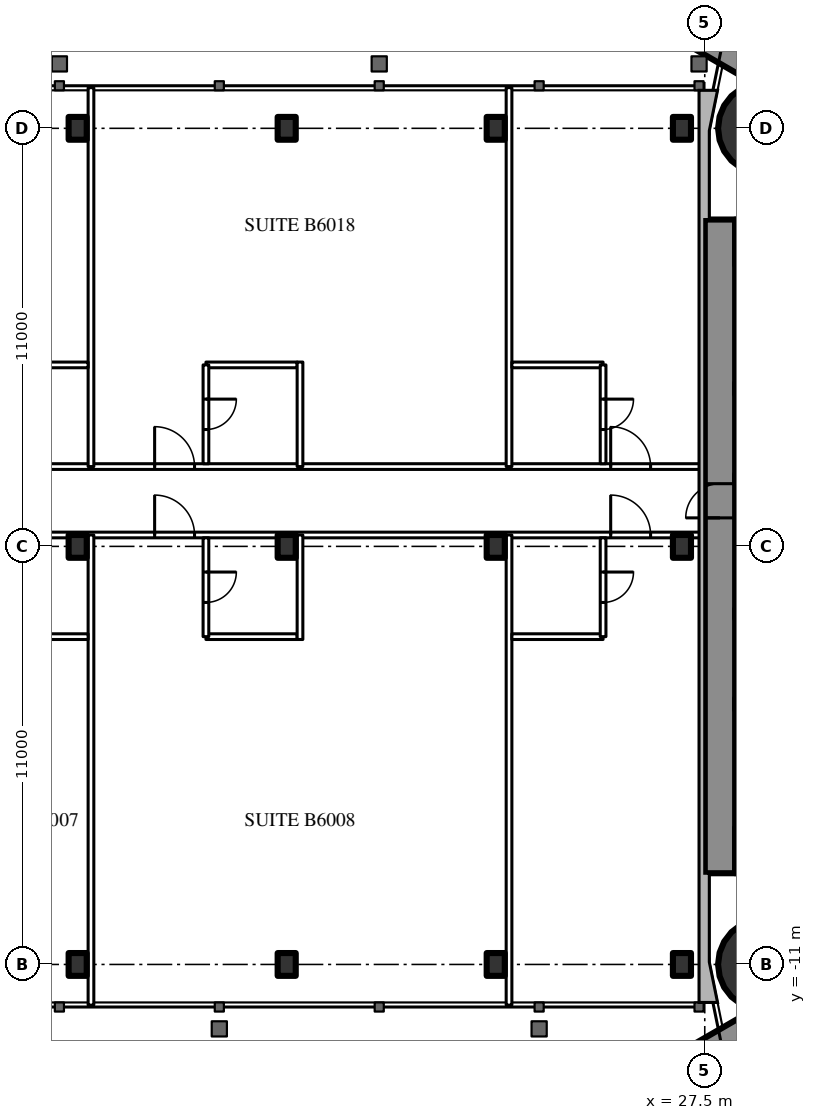
"""IFC4 building model, lengths in metres.
Left out: names, types, materials, properties, quantities, classifications, styles, units other than length and angle.
Written with IfcOpenShell. Run it as: python <this file> out.ifc"""

import sys

from ifc_helpers import new_model, si_unit, direction, frame, frame_2d, origin, origin_2d, place, context, subcontext, project, spatial, rectangle, circle, i_section, extrude, element, fill, save


model = new_model("IFC4")
c1 = context("Model", 3, precision=1e-05, world=origin(), true_north=direction((0.0, 1.0)))
c2 = subcontext(c1, "Body", "Model", "MODEL_VIEW")
j1 = project(units=[si_unit("LENGTHUNIT", "METRE"), si_unit("PLANEANGLEUNIT", "RADIAN")], contexts=[c1])
p1 = place(None, origin())
s1 = spatial("IfcSite", under=j1, at=p1, CompositionType="ELEMENT")
p2 = place(p1, origin())
s2 = spatial("IfcBuilding", under=s1, at=p2, CompositionType="ELEMENT")
p3 = place(p2, frame((0.0, 0.0, 226.1)))
s3 = spatial("IfcBuildingStorey", under=s2, at=p3, CompositionType="ELEMENT", Elevation=226.1)
for number, where, z_axis, x_axis in (
    (1, (29.05, 11.0, 0.0), (0.0, 0.0, 1.0), (1.0, 0.0, 0.0)),
    (2, (29.05, -11.0, 0.0), (0.0, 0.0, 1.0), (1.0, 0.0, 0.0)),
):
    element("IfcColumn", number, at=place(p3, frame(where, z_axis=z_axis, x_axis=x_axis)), inside=s3, PredefinedType="COLUMN", context=c2, shape_type="SweptSolid", body=[
        extrude(circle(Radius=1.2, at=origin_2d()), origin(), (0.0, 0.0, 1.0), 3.6),
    ])
p4 = place(p3, frame((27.9, -8.6, 0.0), z_axis=(0.0, 0.0, 1.0), x_axis=(0.0, 1.0, 0.0)))
e3 = element("IfcWall", 3, at=p4, inside=s3, PredefinedType="SHEAR", context=c2, shape_type="SweptSolid", body=[
    extrude(rectangle(XDim=17.2, YDim=0.8, at=frame_2d((8.6, 0.0))), origin(), (0.0, 0.0, 1.0), 3.6),
])
p5 = place(p4, frame((9.35, 0.0, 0.0)))
e4 = element("IfcOpeningElement", 4, at=p5, cuts=e3, PredefinedType="OPENING", context=c2, shape_type="SweptSolid", body=[
    extrude(rectangle(XDim=0.9, YDim=2.2, at=frame_2d((0.45, 1.1))), frame((0.0, 0.41, 0.0), z_axis=(0.0, -1.0, 0.0), x_axis=(1.0, 0.0, 0.0)), (0.0, 0.0, 1.0), 0.82),
])
p6 = place(p3, frame((28.3, -8.0, 0.0), z_axis=(0.0, 0.0, 1.0), x_axis=(1.0, 0.0, 0.0)))
e5 = element("IfcWall", 5, at=p6, inside=s3, PredefinedType="SHEAR", context=c2, shape_type="SweptSolid", body=[
    extrude(rectangle(XDim=8.4, YDim=1.2, at=frame_2d((4.2, 0.0))), origin(), (0.0, 0.0, 1.0), 3.6),
])
p7 = place(p6, frame((0.25, 0.0, 0.0)))
e6 = element("IfcOpeningElement", 6, at=p7, cuts=e5, PredefinedType="OPENING", context=c2, shape_type="SweptSolid", body=[
    extrude(rectangle(XDim=1.0, YDim=2.2, at=frame_2d((0.5, 1.1))), frame((0.0, 0.61, 0.0), z_axis=(0.0, -1.0, 0.0), x_axis=(1.0, 0.0, 0.0)), (0.0, 0.0, 1.0), 1.22),
])
p8 = place(p3, frame((28.3, 8.0, 0.0), z_axis=(0.0, 0.0, 1.0), x_axis=(1.0, 0.0, 0.0)))
e7 = element("IfcWall", 7, at=p8, inside=s3, PredefinedType="SHEAR", context=c2, shape_type="SweptSolid", body=[
    extrude(rectangle(XDim=8.4, YDim=1.2, at=frame_2d((4.2, 0.0))), origin(), (0.0, 0.0, 1.0), 3.6),
])
p9 = place(p8, frame((0.25, 0.0, 0.0)))
e8 = element("IfcOpeningElement", 8, at=p9, cuts=e7, PredefinedType="OPENING", context=c2, shape_type="SweptSolid", body=[
    extrude(rectangle(XDim=1.0, YDim=2.2, at=frame_2d((0.5, 1.1))), frame((0.0, 0.61, 0.0), z_axis=(0.0, -1.0, 0.0), x_axis=(1.0, 0.0, 0.0)), (0.0, 0.0, 1.0), 1.22),
])
for number, where, z_axis, x_axis in (
    (9, (28.3, -4.15, 0.0), (0.0, 0.0, 1.0), (1.0, 0.0, 0.0)),
    (10, (28.3, 4.15, 0.0), (0.0, 0.0, 1.0), (1.0, 0.0, 0.0)),
):
    element("IfcWall", number, at=place(p3, frame(where, z_axis=z_axis, x_axis=x_axis)), inside=s3, PredefinedType="SHEAR", context=c2, shape_type="SweptSolid", body=[
        extrude(rectangle(XDim=8.4, YDim=0.3, at=frame_2d((4.2, 0.0))), origin(), (0.0, 0.0, 1.0), 3.6),
    ])
for number, where, z_axis, x_axis in (
    (11, (28.3, -1.775, 0.0), (0.0, 0.0, 1.0), (1.0, 0.0, 0.0)),
    (12, (28.3, 1.775, 0.0), (0.0, 0.0, 1.0), (1.0, 0.0, 0.0)),
):
    element("IfcWall", number, at=place(p3, frame(where, z_axis=z_axis, x_axis=x_axis)), inside=s3, PredefinedType="SHEAR", context=c2, shape_type="SweptSolid", body=[
        extrude(rectangle(XDim=2.9, YDim=0.25, at=frame_2d((1.45, 0.0))), origin(), (0.0, 0.0, 1.0), 3.6),
    ])
p10 = place(p3, frame((27.2, -13.8, 0.0), z_axis=(0.0, 0.0, 1.0), x_axis=(0.866027159892, 0.499996958321, 0.0)))
e13 = element("IfcWall", 13, at=p10, inside=s3, PredefinedType="SHEAR", context=c2, shape_type="SweptSolid", body=[
    extrude(rectangle(XDim=27.947, YDim=1.2, at=frame_2d((13.973, 0.0))), origin(), (0.0, 0.0, 1.0), 3.6),
])
p11 = place(p10, frame((4.6, 0.0, 0.0)))
e14 = element("IfcOpeningElement", 14, at=p11, cuts=e13, PredefinedType="OPENING", context=c2, shape_type="SweptSolid", body=[
    extrude(rectangle(XDim=1.0, YDim=2.2, at=frame_2d((0.5, 1.1))), frame((0.0, 0.61, 0.0), z_axis=(0.0, -1.0, 0.0), x_axis=(1.0, 0.0, 0.0)), (0.0, 0.0, 1.0), 1.22),
])
p12 = place(p10, frame((13.395, 0.0, 0.0)))
e15 = element("IfcOpeningElement", 15, at=p12, cuts=e13, PredefinedType="OPENING", context=c2, shape_type="SweptSolid", body=[
    extrude(rectangle(XDim=1.8, YDim=2.2, at=frame_2d((0.9, 1.1))), frame((0.0, 0.61, 0.0), z_axis=(0.0, -1.0, 0.0), x_axis=(1.0, 0.0, 0.0)), (0.0, 0.0, 1.0), 1.22),
])
p13 = place(p3, frame((27.2, 13.8, 0.0), z_axis=(0.0, 0.0, 1.0), x_axis=(0.866024515034, -0.500001539357, 0.0)))
e16 = element("IfcWall", 16, at=p13, inside=s3, PredefinedType="SHEAR", context=c2, shape_type="SweptSolid", body=[
    extrude(rectangle(XDim=26.907, YDim=1.2, at=frame_2d((13.454, 0.0))), origin(), (0.0, 0.0, 1.0), 3.6),
])
p14 = place(p13, frame((4.6, 0.0, 0.0)))
e17 = element("IfcOpeningElement", 17, at=p14, cuts=e16, PredefinedType="OPENING", context=c2, shape_type="SweptSolid", body=[
    extrude(rectangle(XDim=1.0, YDim=2.2, at=frame_2d((0.5, 1.1))), frame((0.0, 0.61, 0.0), z_axis=(0.0, -1.0, 0.0), x_axis=(1.0, 0.0, 0.0)), (0.0, 0.0, 1.0), 1.22),
])
p15 = place(p13, frame((13.395, 0.0, 0.0)))
e18 = element("IfcOpeningElement", 18, at=p15, cuts=e16, PredefinedType="OPENING", context=c2, shape_type="SweptSolid", body=[
    extrude(rectangle(XDim=1.8, YDim=2.2, at=frame_2d((0.9, 1.1))), frame((0.0, 0.61, 0.0), z_axis=(0.0, -1.0, 0.0), x_axis=(1.0, 0.0, 0.0)), (0.0, 0.0, 1.0), 1.22),
])
for number, where, z_axis, x_axis in (
    (19, (11.0, -11.0, 0.0), (0.0, 0.0, 1.0), (1.0, 0.0, 0.0)),
    (20, (16.5, -11.0, 0.0), (0.0, 0.0, 1.0), (1.0, 0.0, 0.0)),
    (21, (22.0, -11.0, 0.0), (0.0, 0.0, 1.0), (1.0, 0.0, 0.0)),
    (22, (26.9, -11.0, 0.0), (0.0, 0.0, 1.0), (1.0, 0.0, 0.0)),
    (23, (11.0, 0.0, 0.0), (0.0, 0.0, 1.0), (1.0, 0.0, 0.0)),
    (24, (16.5, 0.0, 0.0), (0.0, 0.0, 1.0), (1.0, 0.0, 0.0)),
    (25, (22.0, 0.0, 0.0), (0.0, 0.0, 1.0), (1.0, 0.0, 0.0)),
    (26, (26.9, 0.0, 0.0), (0.0, 0.0, 1.0), (1.0, 0.0, 0.0)),
    (27, (11.0, 11.0, 0.0), (0.0, 0.0, 1.0), (1.0, 0.0, 0.0)),
    (28, (16.5, 11.0, 0.0), (0.0, 0.0, 1.0), (1.0, 0.0, 0.0)),
    (29, (22.0, 11.0, 0.0), (0.0, 0.0, 1.0), (1.0, 0.0, 0.0)),
    (30, (26.9, 11.0, 0.0), (0.0, 0.0, 1.0), (1.0, 0.0, 0.0)),
):
    element("IfcColumn", number, at=place(p3, frame(where, z_axis=z_axis, x_axis=x_axis)), inside=s3, PredefinedType="COLUMN", context=c2, shape_type="SweptSolid", body=[
        extrude(i_section(OverallWidth=0.476, OverallDepth=0.6, WebThickness=0.1, FlangeThickness=0.14, FilletRadius=0.02, at=origin_2d()), origin(), (0.0, 0.0, 1.0), 3.6),
    ])
p16 = place(p3, frame((-27.5, 0.3, 0.0), z_axis=(0.0, 0.0, 1.0), x_axis=(1.0, 0.0, 0.0)))
e31 = element("IfcWall", 31, at=p16, inside=s3, PredefinedType="PARTITIONING", context=c2, shape_type="SweptSolid", body=[
    extrude(rectangle(XDim=55.0, YDim=0.15, at=frame_2d((27.5, 0.0))), origin(), (0.0, 0.0, 1.0), 2.4),
])
p17 = place(p16, frame((1.575, 0.0, 0.0)))
e32 = element("IfcOpeningElement", 32, at=p17, cuts=e31, PredefinedType="OPENING", context=c2, shape_type="SweptSolid", body=[
    extrude(rectangle(XDim=1.0, YDim=2.2, at=frame_2d((0.5, 1.1))), frame((0.0, 0.085, 0.0), z_axis=(0.0, -1.0, 0.0), x_axis=(1.0, 0.0, 0.0)), (0.0, 0.0, 1.0), 0.17),
])
p18 = place(p16, frame((7.525, 0.0, 0.0)))
e33 = element("IfcOpeningElement", 33, at=p18, cuts=e31, PredefinedType="OPENING", context=c2, shape_type="SweptSolid", body=[
    extrude(rectangle(XDim=1.05, YDim=2.4, at=frame_2d((0.525, 1.2))), frame((0.0, 0.085, 0.0), z_axis=(0.0, -1.0, 0.0), x_axis=(1.0, 0.0, 0.0)), (0.0, 0.0, 1.0), 0.17),
])
p19 = place(p16, frame((18.525, 0.0, 0.0)))
e34 = element("IfcOpeningElement", 34, at=p19, cuts=e31, PredefinedType="OPENING", context=c2, shape_type="SweptSolid", body=[
    extrude(rectangle(XDim=1.05, YDim=2.4, at=frame_2d((0.525, 1.2))), frame((0.0, 0.085, 0.0), z_axis=(0.0, -1.0, 0.0), x_axis=(1.0, 0.0, 0.0)), (0.0, 0.0, 1.0), 0.17),
])
p20 = place(p16, frame((24.025, 0.0, 0.0)))
e35 = element("IfcOpeningElement", 35, at=p20, cuts=e31, PredefinedType="OPENING", context=c2, shape_type="SweptSolid", body=[
    extrude(rectangle(XDim=1.05, YDim=2.4, at=frame_2d((0.525, 1.2))), frame((0.0, 0.085, 0.0), z_axis=(0.0, -1.0, 0.0), x_axis=(1.0, 0.0, 0.0)), (0.0, 0.0, 1.0), 0.17),
])
p21 = place(p16, frame((35.025, 0.0, 0.0)))
e36 = element("IfcOpeningElement", 36, at=p21, cuts=e31, PredefinedType="OPENING", context=c2, shape_type="SweptSolid", body=[
    extrude(rectangle(XDim=1.05, YDim=2.4, at=frame_2d((0.525, 1.2))), frame((0.0, 0.085, 0.0), z_axis=(0.0, -1.0, 0.0), x_axis=(1.0, 0.0, 0.0)), (0.0, 0.0, 1.0), 0.17),
])
p22 = place(p16, frame((40.525, 0.0, 0.0)))
e37 = element("IfcOpeningElement", 37, at=p22, cuts=e31, PredefinedType="OPENING", context=c2, shape_type="SweptSolid", body=[
    extrude(rectangle(XDim=1.05, YDim=2.4, at=frame_2d((0.525, 1.2))), frame((0.0, 0.085, 0.0), z_axis=(0.0, -1.0, 0.0), x_axis=(1.0, 0.0, 0.0)), (0.0, 0.0, 1.0), 0.17),
])
p23 = place(p16, frame((52.525, 0.0, 0.0)))
e38 = element("IfcOpeningElement", 38, at=p23, cuts=e31, PredefinedType="OPENING", context=c2, shape_type="SweptSolid", body=[
    extrude(rectangle(XDim=1.05, YDim=2.4, at=frame_2d((0.525, 1.2))), frame((0.0, 0.085, 0.0), z_axis=(0.0, -1.0, 0.0), x_axis=(1.0, 0.0, 0.0)), (0.0, 0.0, 1.0), 0.17),
])
p24 = place(p3, frame((5.85, 2.1, 0.0), z_axis=(0.0, 0.0, 1.0), x_axis=(1.0, 0.0, 0.0)))
e39 = element("IfcWall", 39, at=p24, inside=s3, PredefinedType="PARTITIONING", context=c2, shape_type="SweptSolid", body=[
    extrude(rectangle(XDim=21.65, YDim=0.15, at=frame_2d((10.825, 0.0))), origin(), (0.0, 0.0, 1.0), 3.4),
])
p25 = place(p24, frame((1.675, 0.0, 0.0)))
e40 = element("IfcOpeningElement", 40, at=p25, cuts=e39, PredefinedType="OPENING", context=c2, shape_type="SweptSolid", body=[
    extrude(rectangle(XDim=1.05, YDim=2.4, at=frame_2d((0.525, 1.2))), frame((0.0, 0.085, 0.0), z_axis=(0.0, -1.0, 0.0), x_axis=(1.0, 0.0, 0.0)), (0.0, 0.0, 1.0), 0.17),
])
p26 = place(p24, frame((7.175, 0.0, 0.0)))
e41 = element("IfcOpeningElement", 41, at=p26, cuts=e39, PredefinedType="OPENING", context=c2, shape_type="SweptSolid", body=[
    extrude(rectangle(XDim=1.05, YDim=2.4, at=frame_2d((0.525, 1.2))), frame((0.0, 0.085, 0.0), z_axis=(0.0, -1.0, 0.0), x_axis=(1.0, 0.0, 0.0)), (0.0, 0.0, 1.0), 0.17),
])
p27 = place(p24, frame((19.175, 0.0, 0.0)))
e42 = element("IfcOpeningElement", 42, at=p27, cuts=e39, PredefinedType="OPENING", context=c2, shape_type="SweptSolid", body=[
    extrude(rectangle(XDim=1.05, YDim=2.4, at=frame_2d((0.525, 1.2))), frame((0.0, 0.085, 0.0), z_axis=(0.0, -1.0, 0.0), x_axis=(1.0, 0.0, 0.0)), (0.0, 0.0, 1.0), 0.17),
])
for number, where, z_axis, x_axis in (
    (43, (11.35, -12.07, 0.0), (0.0, 0.0, 1.0), (0.0, 1.0, 0.0)),
    (44, (22.35, -12.07, 0.0), (0.0, 0.0, 1.0), (0.0, 1.0, 0.0)),
):
    element("IfcWall", number, at=place(p3, frame(where, z_axis=z_axis, x_axis=x_axis)), inside=s3, PredefinedType="PARTITIONING", context=c2, shape_type="SweptSolid", body=[
        extrude(rectangle(XDim=12.37, YDim=0.15, at=frame_2d((6.185, 0.0))), origin(), (0.0, 0.0, 1.0), 3.4),
    ])
for number, where, z_axis, x_axis in (
    (45, (8.875, -2.375, 0.0), (0.0, 0.0, 1.0), (1.0, 0.0, 0.0)),
    (46, (14.375, -2.375, 0.0), (0.0, 0.0, 1.0), (1.0, 0.0, 0.0)),
):
    element("IfcWall", number, at=place(p3, frame(where, z_axis=z_axis, x_axis=x_axis)), inside=s3, PredefinedType="PARTITIONING", context=c2, shape_type="SweptSolid", body=[
        extrude(rectangle(XDim=2.4, YDim=0.15, at=frame_2d((1.2, 0.0))), origin(), (0.0, 0.0, 1.0), 3.4),
    ])
p28 = place(p3, frame((14.375, -2.375, 0.0), z_axis=(0.0, 0.0, 1.0), x_axis=(0.0, 1.0, 0.0)))
e47 = element("IfcWall", 47, at=p28, inside=s3, PredefinedType="PARTITIONING", context=c2, shape_type="SweptSolid", body=[
    extrude(rectangle(XDim=2.6, YDim=0.15, at=frame_2d((1.3, 0.0))), origin(), (0.0, 0.0, 1.0), 3.4),
])
p29 = place(p28, frame((0.9, 0.0, 0.0)))
e48 = element("IfcOpeningElement", 48, at=p29, cuts=e47, PredefinedType="OPENING", context=c2, shape_type="SweptSolid", body=[
    extrude(rectangle(XDim=0.8, YDim=2.2, at=frame_2d((0.4, 1.1))), frame((0.0, 0.085, 0.0), z_axis=(0.0, -1.0, 0.0), x_axis=(1.0, 0.0, 0.0)), (0.0, 0.0, 1.0), 0.17),
])
p30 = place(p3, frame((22.425, -2.375, 0.0), z_axis=(0.0, 0.0, 1.0), x_axis=(1.0, 0.0, 0.0)))
e49 = element("IfcWall", 49, at=p30, inside=s3, PredefinedType="PARTITIONING", context=c2, shape_type="SweptSolid", body=[
    extrude(rectangle(XDim=2.4, YDim=0.15, at=frame_2d((1.2, 0.0))), origin(), (0.0, 0.0, 1.0), 3.4),
])
p31 = place(p3, frame((24.825, -2.375, 0.0), z_axis=(0.0, 0.0, 1.0), x_axis=(0.0, 1.0, 0.0)))
e50 = element("IfcWall", 50, at=p31, inside=s3, PredefinedType="PARTITIONING", context=c2, shape_type="SweptSolid", body=[
    extrude(rectangle(XDim=2.6, YDim=0.15, at=frame_2d((1.3, 0.0))), origin(), (0.0, 0.0, 1.0), 3.4),
])
p32 = place(p31, frame((0.9, 0.0, 0.0)))
e51 = element("IfcOpeningElement", 51, at=p32, cuts=e50, PredefinedType="OPENING", context=c2, shape_type="SweptSolid", body=[
    extrude(rectangle(XDim=0.8, YDim=2.2, at=frame_2d((0.4, 1.1))), frame((0.0, 0.085, 0.0), z_axis=(0.0, -1.0, 0.0), x_axis=(1.0, 0.0, 0.0)), (0.0, 0.0, 1.0), 0.17),
])
for number, where, z_axis, x_axis in (
    (52, (11.35, 2.1, 0.0), (0.0, 0.0, 1.0), (0.0, 1.0, 0.0)),
    (53, (22.35, 2.1, 0.0), (0.0, 0.0, 1.0), (0.0, 1.0, 0.0)),
):
    element("IfcWall", number, at=place(p3, frame(where, z_axis=z_axis, x_axis=x_axis)), inside=s3, PredefinedType="PARTITIONING", context=c2, shape_type="SweptSolid", body=[
        extrude(rectangle(XDim=9.97, YDim=0.15, at=frame_2d((4.985, 0.0))), origin(), (0.0, 0.0, 1.0), 3.4),
    ])
for number, where, z_axis, x_axis in (
    (54, (8.875, 4.775, 0.0), (0.0, 0.0, 1.0), (1.0, 0.0, 0.0)),
    (55, (14.375, 4.775, 0.0), (0.0, 0.0, 1.0), (1.0, 0.0, 0.0)),
):
    element("IfcWall", number, at=place(p3, frame(where, z_axis=z_axis, x_axis=x_axis)), inside=s3, PredefinedType="PARTITIONING", context=c2, shape_type="SweptSolid", body=[
        extrude(rectangle(XDim=2.4, YDim=0.15, at=frame_2d((1.2, 0.0))), origin(), (0.0, 0.0, 1.0), 3.4),
    ])
p33 = place(p3, frame((14.375, 2.175, 0.0), z_axis=(0.0, 0.0, 1.0), x_axis=(0.0, 1.0, 0.0)))
e56 = element("IfcWall", 56, at=p33, inside=s3, PredefinedType="PARTITIONING", context=c2, shape_type="SweptSolid", body=[
    extrude(rectangle(XDim=2.6, YDim=0.15, at=frame_2d((1.3, 0.0))), origin(), (0.0, 0.0, 1.0), 3.4),
])
p34 = place(p33, frame((0.9, 0.0, 0.0)))
e57 = element("IfcOpeningElement", 57, at=p34, cuts=e56, PredefinedType="OPENING", context=c2, shape_type="SweptSolid", body=[
    extrude(rectangle(XDim=0.8, YDim=2.2, at=frame_2d((0.4, 1.1))), frame((0.0, 0.085, 0.0), z_axis=(0.0, -1.0, 0.0), x_axis=(1.0, 0.0, 0.0)), (0.0, 0.0, 1.0), 0.17),
])
p35 = place(p3, frame((22.425, 4.775, 0.0), z_axis=(0.0, 0.0, 1.0), x_axis=(1.0, 0.0, 0.0)))
e58 = element("IfcWall", 58, at=p35, inside=s3, PredefinedType="PARTITIONING", context=c2, shape_type="SweptSolid", body=[
    extrude(rectangle(XDim=2.4, YDim=0.15, at=frame_2d((1.2, 0.0))), origin(), (0.0, 0.0, 1.0), 3.4),
])
p36 = place(p3, frame((24.825, 2.175, 0.0), z_axis=(0.0, 0.0, 1.0), x_axis=(0.0, 1.0, 0.0)))
e59 = element("IfcWall", 59, at=p36, inside=s3, PredefinedType="PARTITIONING", context=c2, shape_type="SweptSolid", body=[
    extrude(rectangle(XDim=2.6, YDim=0.15, at=frame_2d((1.3, 0.0))), origin(), (0.0, 0.0, 1.0), 3.4),
])
p37 = place(p36, frame((0.9, 0.0, 0.0)))
e60 = element("IfcOpeningElement", 60, at=p37, cuts=e59, PredefinedType="OPENING", context=c2, shape_type="SweptSolid", body=[
    extrude(rectangle(XDim=0.8, YDim=2.2, at=frame_2d((0.4, 1.1))), frame((0.0, 0.085, 0.0), z_axis=(0.0, -1.0, 0.0), x_axis=(1.0, 0.0, 0.0)), (0.0, 0.0, 1.0), 0.17),
])
for number, where, z_axis, x_axis in (
    (61, (16.85, -2.45, 0.0), (0.0, 0.0, 1.0), (0.0, 1.0, 0.0)),
    (62, (16.85, 2.1, 0.0), (0.0, 0.0, 1.0), (0.0, 1.0, 0.0)),
):
    element("IfcWall", number, at=place(p3, frame(where, z_axis=z_axis, x_axis=x_axis)), inside=s3, PredefinedType="PARTITIONING", context=c2, shape_type="SweptSolid", body=[
        extrude(rectangle(XDim=2.75, YDim=0.15, at=frame_2d((1.375, 0.0))), origin(), (0.0, 0.0, 1.0), 3.4),
    ])
p38 = place(p5, origin())
e63 = element("IfcDoor", 63, at=p38, inside=s3, OperationType="SINGLE_SWING_LEFT", PredefinedType="DOOR", context=c2, shape_type="SweptSolid", body=[
    extrude(rectangle(XDim=0.9, YDim=2.2, at=frame_2d((0.45, 1.1))), frame((0.0, 0.025, 0.0), z_axis=(0.0, -1.0, 0.0), x_axis=(1.0, 0.0, 0.0)), (0.0, 0.0, 1.0), 0.05),
])
fill(e4, e63)
p39 = place(p29, origin())
e64 = element("IfcDoor", 64, at=p39, inside=s3, OperationType="SINGLE_SWING_RIGHT", PredefinedType="DOOR", context=c2, shape_type="SweptSolid", body=[
    extrude(rectangle(XDim=0.8, YDim=2.2, at=frame_2d((0.4, 1.1))), frame((0.0, 0.025, 0.0), z_axis=(0.0, -1.0, 0.0), x_axis=(1.0, 0.0, 0.0)), (0.0, 0.0, 1.0), 0.05),
])
fill(e48, e64)
p40 = place(p22, origin())
e65 = element("IfcDoor", 65, at=p40, inside=s3, OperationType="SINGLE_SWING_LEFT", PredefinedType="DOOR", context=c2, shape_type="SweptSolid", body=[
    extrude(rectangle(XDim=1.05, YDim=2.4, at=frame_2d((0.525, 1.2))), frame((0.0, 0.025, 0.0), z_axis=(0.0, -1.0, 0.0), x_axis=(1.0, 0.0, 0.0)), (0.0, 0.0, 1.0), 0.05),
])
fill(e37, e65)
p41 = place(p32, origin())
e66 = element("IfcDoor", 66, at=p41, inside=s3, OperationType="SINGLE_SWING_RIGHT", PredefinedType="DOOR", context=c2, shape_type="SweptSolid", body=[
    extrude(rectangle(XDim=0.8, YDim=2.2, at=frame_2d((0.4, 1.1))), frame((0.0, 0.025, 0.0), z_axis=(0.0, -1.0, 0.0), x_axis=(1.0, 0.0, 0.0)), (0.0, 0.0, 1.0), 0.05),
])
fill(e51, e66)
p42 = place(p23, origin())
e67 = element("IfcDoor", 67, at=p42, inside=s3, OperationType="SINGLE_SWING_LEFT", PredefinedType="DOOR", context=c2, shape_type="SweptSolid", body=[
    extrude(rectangle(XDim=1.05, YDim=2.4, at=frame_2d((0.525, 1.2))), frame((0.0, 0.025, 0.0), z_axis=(0.0, -1.0, 0.0), x_axis=(1.0, 0.0, 0.0)), (0.0, 0.0, 1.0), 0.05),
])
fill(e38, e67)
p43 = place(p34, origin())
e68 = element("IfcDoor", 68, at=p43, inside=s3, OperationType="SINGLE_SWING_RIGHT", PredefinedType="DOOR", context=c2, shape_type="SweptSolid", body=[
    extrude(rectangle(XDim=0.8, YDim=2.2, at=frame_2d((0.4, 1.1))), frame((0.0, 0.025, 0.0), z_axis=(0.0, -1.0, 0.0), x_axis=(1.0, 0.0, 0.0)), (0.0, 0.0, 1.0), 0.05),
])
fill(e57, e68)
p44 = place(p26, origin())
e69 = element("IfcDoor", 69, at=p44, inside=s3, OperationType="SINGLE_SWING_LEFT", PredefinedType="DOOR", context=c2, shape_type="SweptSolid", body=[
    extrude(rectangle(XDim=1.05, YDim=2.4, at=frame_2d((0.525, 1.2))), frame((0.0, 0.025, 0.0), z_axis=(0.0, -1.0, 0.0), x_axis=(1.0, 0.0, 0.0)), (0.0, 0.0, 1.0), 0.05),
])
fill(e41, e69)
p45 = place(p37, origin())
e70 = element("IfcDoor", 70, at=p45, inside=s3, OperationType="SINGLE_SWING_RIGHT", PredefinedType="DOOR", context=c2, shape_type="SweptSolid", body=[
    extrude(rectangle(XDim=0.8, YDim=2.2, at=frame_2d((0.4, 1.1))), frame((0.0, 0.025, 0.0), z_axis=(0.0, -1.0, 0.0), x_axis=(1.0, 0.0, 0.0)), (0.0, 0.0, 1.0), 0.05),
])
fill(e60, e70)
p46 = place(p27, origin())
e71 = element("IfcDoor", 71, at=p46, inside=s3, OperationType="SINGLE_SWING_LEFT", PredefinedType="DOOR", context=c2, shape_type="SweptSolid", body=[
    extrude(rectangle(XDim=1.05, YDim=2.4, at=frame_2d((0.525, 1.2))), frame((0.0, 0.025, 0.0), z_axis=(0.0, -1.0, 0.0), x_axis=(1.0, 0.0, 0.0)), (0.0, 0.0, 1.0), 0.05),
])
fill(e42, e71)
save(model, sys.argv[1])
